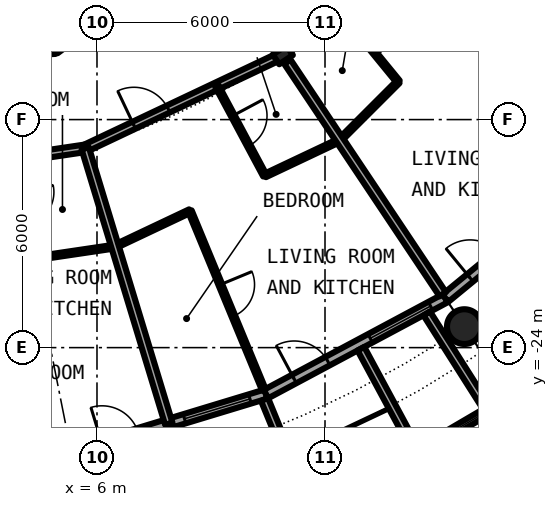
"""IFC4 building model, lengths in metres.
Left out: names, types, materials, properties, quantities, classifications, styles, units other than length and angle.
Written with IfcOpenShell. Run it as: python <this file> out.ifc"""

import sys

from ifc_helpers import new_model, si_unit, direction, frame, frame_2d, origin, origin_2d, place, context, subcontext, project, spatial, rectangle, circle, hollow_circle, i_section, extrude, element, fill, save


model = new_model("IFC4")
c1 = context("Model", 3, precision=1e-05, world=origin(), true_north=direction((0.0, 1.0)))
c2 = subcontext(c1, "Body", "Model", "MODEL_VIEW")
j1 = project(units=[si_unit("LENGTHUNIT", "METRE"), si_unit("PLANEANGLEUNIT", "RADIAN")], contexts=[c1])
p1 = place(None, origin())
s1 = spatial("IfcSite", under=j1, at=p1, CompositionType="ELEMENT")
p2 = place(p1, origin())
s2 = spatial("IfcBuilding", under=s1, at=p2, CompositionType="ELEMENT")
p3 = place(p2, frame((0.0, 0.0, 123.85)))
s3 = spatial("IfcBuildingStorey", under=s2, at=p3, CompositionType="ELEMENT", Elevation=123.85)
p4 = place(p3, frame((15.667, -23.448, 0.0), z_axis=(0.0, 0.0, 1.0), x_axis=(1.0, 0.0, 0.0)))
e1 = element("IfcColumn", 1, at=p4, inside=s3, PredefinedType="COLUMN", context=c2, shape_type="SweptSolid", body=[
    extrude(hollow_circle(Radius=0.457, WallThickness=0.04, at=origin_2d()), origin(), (0.0, 0.0, 1.0), 3.05),
])
p5 = place(p3, frame((10.889, -16.297, 0.0), z_axis=(0.0, 0.0, 1.0), x_axis=(0.55557023302, -0.831469612303, 0.0)))
e2 = element("IfcColumn", 2, at=p5, inside=s3, PredefinedType="COLUMN", context=c2, shape_type="SweptSolid", body=[
    extrude(i_section(OverallWidth=0.307, OverallDepth=0.432, WebThickness=0.021, FlangeThickness=0.04, FilletRadius=0.027, at=origin_2d()), origin(), (0.0, 0.0, 1.0), 3.05),
])
p6 = place(p3, frame((5.326, -26.775, 0.0), z_axis=(0.0, 0.0, 1.0), x_axis=(0.956965678721, 0.290201119486, 0.0)))
e3 = element("IfcWall", 3, at=p6, inside=s3, PredefinedType="SOLIDWALL", context=c2, shape_type="SweptSolid", body=[
    extrude(rectangle(XDim=5.351, YDim=0.25, at=frame_2d((2.676, 0.0))), origin(), (0.0, 0.0, 1.0), 2.7),
])
p7 = place(p6, frame((0.841, 0.0, 0.0)))
e4 = element("IfcOpeningElement", 4, at=p7, cuts=e3, PredefinedType="OPENING", context=c2, shape_type="SweptSolid", body=[
    extrude(rectangle(XDim=1.0, YDim=2.2, at=frame_2d((0.5, 1.1))), frame((0.0, 0.135, 0.0), z_axis=(0.0, -1.0, 0.0), x_axis=(1.0, 0.0, 0.0)), (0.0, 0.0, 1.0), 0.27),
])
p8 = place(p6, frame((3.111, 0.0, 0.3)))
e5 = element("IfcOpeningElement", 5, at=p8, cuts=e3, PredefinedType="OPENING", context=c2, shape_type="SweptSolid", body=[
    extrude(rectangle(XDim=1.8, YDim=2.1, at=frame_2d((0.9, 1.05))), frame((0.0, 0.135, 0.0), z_axis=(0.0, -1.0, 0.0), x_axis=(1.0, 0.0, 0.0)), (0.0, 0.0, 1.0), 0.27),
])
p9 = place(p3, frame((8.009, -26.092, -0.03), z_axis=(0.0, 0.0, 1.0), x_axis=(0.293406695073, -0.955987715029, 0.0)))
e6 = element("IfcWall", 6, at=p9, inside=s3, PredefinedType="SOLIDWALL", context=c2, shape_type="SweptSolid", body=[
    extrude(rectangle(XDim=3.006, YDim=0.2, at=frame_2d((1.503, 0.0))), origin(), (0.0, 0.0, 1.0), 2.73),
])
p10 = place(p3, frame((10.409, -25.364, -0.03), z_axis=(0.0, 0.0, 1.0), x_axis=(0.379509886562, -0.925187681501, 0.0)))
e7 = element("IfcWall", 7, at=p10, inside=s3, PredefinedType="SOLIDWALL", context=c2, shape_type="SweptSolid", body=[
    extrude(rectangle(XDim=2.883, YDim=0.2, at=frame_2d((1.441, 0.0))), origin(), (0.0, 0.0, 1.0), 2.73),
])
p11 = place(p3, frame((10.447, -25.222, 0.0), z_axis=(0.0, 0.0, 1.0), x_axis=(0.881915646801, 0.471407246368, 0.0)))
e8 = element("IfcWall", 8, at=p11, inside=s3, PredefinedType="SOLIDWALL", context=c2, shape_type="SweptSolid", body=[
    extrude(rectangle(XDim=5.352, YDim=0.25, at=frame_2d((2.676, 0.0))), origin(), (0.0, 0.0, 1.0), 2.7),
])
p12 = place(p11, frame((0.841, 0.0, 0.0)))
e9 = element("IfcOpeningElement", 9, at=p12, cuts=e8, PredefinedType="OPENING", context=c2, shape_type="SweptSolid", body=[
    extrude(rectangle(XDim=1.0, YDim=2.2, at=frame_2d((0.5, 1.1))), frame((0.0, 0.135, 0.0), z_axis=(0.0, -1.0, 0.0), x_axis=(1.0, 0.0, 0.0)), (0.0, 0.0, 1.0), 0.27),
])
p13 = place(p11, frame((3.111, 0.0, 0.3)))
e10 = element("IfcOpeningElement", 10, at=p13, cuts=e8, PredefinedType="OPENING", context=c2, shape_type="SweptSolid", body=[
    extrude(rectangle(XDim=1.8, YDim=2.1, at=frame_2d((0.9, 1.05))), frame((0.0, 0.135, 0.0), z_axis=(0.0, -1.0, 0.0), x_axis=(1.0, 0.0, 0.0)), (0.0, 0.0, 1.0), 0.27),
])
p14 = place(p3, frame((14.327, -26.812, -0.03), z_axis=(0.0, 0.0, 1.0), x_axis=(0.862762477128, 0.505609442218, 0.0)))
e11 = element("IfcWall", 11, at=p14, inside=s3, PredefinedType="SOLIDWALL", context=c2, shape_type="SweptSolid", body=[
    extrude(rectangle(XDim=2.391, YDim=0.2, at=frame_2d((1.196, 0.0))), origin(), (0.0, 0.0, 1.0), 2.73),
])
p15 = place(p14, frame((0.156, 0.0, 0.33)))
e12 = element("IfcOpeningElement", 12, at=p15, cuts=e11, PredefinedType="OPENING", context=c2, shape_type="SweptSolid", body=[
    extrude(circle(Radius=1.04, at=frame_2d((1.04, 1.04))), frame((0.0, 0.11, 0.0), z_axis=(0.0, -1.0, 0.0), x_axis=(1.0, 0.0, 0.0)), (0.0, 0.0, 1.0), 0.22),
])
p16 = place(p3, frame((12.945, -24.029, -0.03), z_axis=(0.0, 0.0, 1.0), x_axis=(0.474424310775, -0.88029629861, 0.0)))
e13 = element("IfcWall", 13, at=p16, inside=s3, PredefinedType="SOLIDWALL", context=c2, shape_type="SweptSolid", body=[
    extrude(rectangle(XDim=3.006, YDim=0.2, at=frame_2d((1.503, 0.0))), origin(), (0.0, 0.0, 1.0), 2.73),
])
p17 = place(p3, frame((14.678, -23.102, -0.03), z_axis=(0.0, 0.0, 1.0), x_axis=(0.536001536573, -0.844217005746, 0.0)))
e14 = element("IfcWall", 14, at=p17, inside=s3, PredefinedType="SOLIDWALL", context=c2, shape_type="SweptSolid", body=[
    extrude(rectangle(XDim=2.929, YDim=0.2, at=frame_2d((1.465, 0.0))), origin(), (0.0, 0.0, 1.0), 2.73),
])
p18 = place(p3, frame((15.167, -22.699, 0.0), z_axis=(0.0, 0.0, 1.0), x_axis=(0.773019449054, 0.634382322723, 0.0)))
e15 = element("IfcWall", 15, at=p18, inside=s3, PredefinedType="SOLIDWALL", context=c2, shape_type="SweptSolid", body=[
    extrude(rectangle(XDim=5.352, YDim=0.25, at=frame_2d((2.676, 0.0))), origin(), (0.0, 0.0, 1.0), 2.7),
])
p19 = place(p18, frame((0.841, 0.0, 0.0)))
e16 = element("IfcOpeningElement", 16, at=p19, cuts=e15, PredefinedType="OPENING", context=c2, shape_type="SweptSolid", body=[
    extrude(rectangle(XDim=1.0, YDim=2.2, at=frame_2d((0.5, 1.1))), frame((0.0, 0.135, 0.0), z_axis=(0.0, -1.0, 0.0), x_axis=(1.0, 0.0, 0.0)), (0.0, 0.0, 1.0), 0.27),
])
p20 = place(p18, frame((3.111, 0.0, 0.3)))
e17 = element("IfcOpeningElement", 17, at=p20, cuts=e15, PredefinedType="OPENING", context=c2, shape_type="SweptSolid", body=[
    extrude(rectangle(XDim=1.8, YDim=2.1, at=frame_2d((0.9, 1.05))), frame((0.0, 0.135, 0.0), z_axis=(0.0, -1.0, 0.0), x_axis=(1.0, 0.0, 0.0)), (0.0, 0.0, 1.0), 0.27),
])
p21 = place(p3, frame((4.316, -21.66, 0.0), z_axis=(0.0, 0.0, 1.0), x_axis=(0.989185420695, 0.146670390618, 0.0)))
e18 = element("IfcWall", 18, at=p21, inside=s3, PredefinedType="PARTITIONING", context=c2, shape_type="SweptSolid", body=[
    extrude(rectangle(XDim=2.181, YDim=0.1, at=frame_2d((1.09, 0.0))), origin(), (0.0, 0.0, 1.0), 2.7),
])
p22 = place(p3, frame((6.473, -21.34, 0.0), z_axis=(0.0, 0.0, 1.0), x_axis=(0.903929143338, 0.427682246328, 0.0)))
e19 = element("IfcWall", 19, at=p22, inside=s3, PredefinedType="PARTITIONING", context=c2, shape_type="SweptSolid", body=[
    extrude(rectangle(XDim=2.182, YDim=0.1, at=frame_2d((1.091, 0.0))), origin(), (0.0, 0.0, 1.0), 2.7),
])
p23 = place(p3, frame((10.425, -19.47, 0.0), z_axis=(0.0, 0.0, 1.0), x_axis=(0.903951937529, 0.427634066274, 0.0)))
e20 = element("IfcWall", 20, at=p23, inside=s3, PredefinedType="PARTITIONING", context=c2, shape_type="SweptSolid", body=[
    extrude(rectangle(XDim=2.181, YDim=0.1, at=frame_2d((1.091, 0.0))), origin(), (0.0, 0.0, 1.0), 2.7),
])
p24 = place(p3, frame((12.389, -18.542, 0.0), z_axis=(0.0, 0.0, 1.0), x_axis=(0.707106781187, 0.707106781187, 0.0)))
e21 = element("IfcWall", 21, at=p24, inside=s3, PredefinedType="PARTITIONING", context=c2, shape_type="SweptSolid", body=[
    extrude(rectangle(XDim=2.175, YDim=0.1, at=frame_2d((1.088, 0.0))), origin(), (0.0, 0.0, 1.0), 2.7),
])
p25 = place(p3, frame((3.939, -19.015, 0.0), z_axis=(0.0, 0.0, 1.0), x_axis=(0.989227802256, 0.146384272531, 0.0)))
e22 = element("IfcWall", 22, at=p25, inside=s3, PredefinedType="PARTITIONING", context=c2, shape_type="SweptSolid", body=[
    extrude(rectangle(XDim=1.776, YDim=0.2, at=frame_2d((0.888, 0.0))), origin(), (0.0, 0.0, 1.0), 2.39),
])
p26 = place(p3, frame((5.69, -18.756, 0.0), z_axis=(0.0, 0.0, 1.0), x_axis=(0.903968655954, 0.427598724335, 0.0)))
e23 = element("IfcWall", 23, at=p26, inside=s3, PredefinedType="PARTITIONING", context=c2, shape_type="SweptSolid", body=[
    extrude(rectangle(XDim=5.596, YDim=0.2, at=frame_2d((2.798, 0.0))), origin(), (0.0, 0.0, 1.0), 2.39),
])
p27 = place(p26, frame((1.418, 0.0, 0.0)))
e24 = element("IfcOpeningElement", 24, at=p27, cuts=e23, PredefinedType="OPENING", context=c2, shape_type="SweptSolid", body=[
    extrude(rectangle(XDim=1.0, YDim=2.3, at=frame_2d((0.5, 1.15))), frame((0.0, 0.11, 0.0), z_axis=(0.0, -1.0, 0.0), x_axis=(1.0, 0.0, 0.0)), (0.0, 0.0, 1.0), 0.22),
])
p28 = place(p3, frame((11.0, -16.186, 0.0), z_axis=(0.0, 0.0, 1.0), x_axis=(0.707106781187, 0.707106781187, 0.0)))
e25 = element("IfcWall", 25, at=p28, inside=s3, PredefinedType="PARTITIONING", context=c2, shape_type="SweptSolid", body=[
    extrude(rectangle(XDim=7.334, YDim=0.2, at=frame_2d((3.667, 0.0))), origin(), (0.0, 0.0, 1.0), 2.39),
])
p29 = place(p28, frame((4.123, 0.0, 0.0)))
e26 = element("IfcOpeningElement", 26, at=p29, cuts=e25, PredefinedType="OPENING", context=c2, shape_type="SweptSolid", body=[
    extrude(rectangle(XDim=1.0, YDim=2.3, at=frame_2d((0.5, 1.15))), frame((0.0, 0.11, 0.0), z_axis=(0.0, -1.0, 0.0), x_axis=(1.0, 0.0, 0.0)), (0.0, 0.0, 1.0), 0.22),
])
p30 = place(p3, frame((-3.297, -16.575, 0.0), z_axis=(0.0, 0.0, 1.0), x_axis=(0.998796706656, 0.0490422142, 0.0)))
e27 = element("IfcWall", 27, at=p30, inside=s3, PredefinedType="PARTITIONING", context=c2, shape_type="SweptSolid", body=[
    extrude(rectangle(XDim=8.214, YDim=0.2, at=frame_2d((4.107, 0.0))), origin(), (0.0, 0.0, 1.0), 2.7),
])
p31 = place(p30, frame((3.614, 0.0, 0.0)))
e28 = element("IfcOpeningElement", 28, at=p31, cuts=e27, PredefinedType="OPENING", context=c2, shape_type="SweptSolid", body=[
    extrude(rectangle(XDim=1.0, YDim=2.3, at=frame_2d((0.5, 1.15))), frame((0.0, 0.11, 0.0), z_axis=(0.0, -1.0, 0.0), x_axis=(1.0, 0.0, 0.0)), (0.0, 0.0, 1.0), 0.22),
])
p32 = place(p3, frame((4.906, -16.172, 0.0), z_axis=(0.0, 0.0, 1.0), x_axis=(0.803191461888, 0.595720971219, 0.0)))
e29 = element("IfcWall", 29, at=p32, inside=s3, PredefinedType="PARTITIONING", context=c2, shape_type="SweptSolid", body=[
    extrude(rectangle(XDim=9.76, YDim=0.2, at=frame_2d((4.88, 0.0))), origin(), (0.0, 0.0, 1.0), 2.7),
])
p33 = place(p32, frame((4.38, 0.0, 0.0)))
e30 = element("IfcOpeningElement", 30, at=p33, cuts=e29, PredefinedType="OPENING", context=c2, shape_type="SweptSolid", body=[
    extrude(rectangle(XDim=1.0, YDim=2.3, at=frame_2d((0.5, 1.15))), frame((0.0, 0.11, 0.0), z_axis=(0.0, -1.0, 0.0), x_axis=(1.0, 0.0, 0.0)), (0.0, 0.0, 1.0), 0.22),
])
p34 = place(p3, frame((5.69, -18.756, 0.0), z_axis=(0.0, 0.0, 1.0), x_axis=(0.290448401467, -0.95689065524, 0.0)))
e31 = element("IfcWall", 31, at=p34, inside=s3, PredefinedType="PARTITIONING", context=c2, shape_type="SweptSolid", body=[
    extrude(rectangle(XDim=7.574, YDim=0.2, at=frame_2d((3.787, 0.0))), origin(), (0.0, 0.0, 1.0), 2.7),
])
p35 = place(p3, frame((8.445, -20.407, 0.0), z_axis=(0.0, 0.0, 1.0), x_axis=(0.382339082848, -0.92402209158, 0.0)))
e32 = element("IfcWall", 32, at=p35, inside=s3, PredefinedType="PARTITIONING", context=c2, shape_type="SweptSolid", body=[
    extrude(rectangle(XDim=5.09, YDim=0.1, at=frame_2d((2.545, 0.0))), origin(), (0.0, 0.0, 1.0), 2.7),
])
p36 = place(p35, frame((2.095, 0.0, 0.0)))
e33 = element("IfcOpeningElement", 33, at=p36, cuts=e32, PredefinedType="OPENING", context=c2, shape_type="SweptSolid", body=[
    extrude(rectangle(XDim=0.9, YDim=2.3, at=frame_2d((0.45, 1.15))), frame((0.0, 0.06, 0.0), z_axis=(0.0, -1.0, 0.0), x_axis=(1.0, 0.0, 0.0)), (0.0, 0.0, 1.0), 0.12),
])
p37 = place(p3, frame((9.156, -17.117, 0.0), z_axis=(0.0, 0.0, 1.0), x_axis=(0.471701791767, -0.881758141241, 0.0)))
e34 = element("IfcWall", 34, at=p37, inside=s3, PredefinedType="PARTITIONING", context=c2, shape_type="SweptSolid", body=[
    extrude(rectangle(XDim=2.673, YDim=0.1, at=frame_2d((1.337, 0.0))), origin(), (0.0, 0.0, 1.0), 2.7),
])
p38 = place(p37, frame((0.887, 0.0, 0.0)))
e35 = element("IfcOpeningElement", 35, at=p38, cuts=e34, PredefinedType="OPENING", context=c2, shape_type="SweptSolid", body=[
    extrude(rectangle(XDim=0.9, YDim=2.3, at=frame_2d((0.45, 1.15))), frame((0.0, 0.06, 0.0), z_axis=(0.0, -1.0, 0.0), x_axis=(1.0, 0.0, 0.0)), (0.0, 0.0, 1.0), 0.12),
])
p39 = place(p3, frame((11.009, -16.477, 0.0), z_axis=(0.0, 0.0, 1.0), x_axis=(0.555664536482, -0.831406593008, 0.0)))
e36 = element("IfcWall", 36, at=p39, inside=s3, PredefinedType="PARTITIONING", context=c2, shape_type="SweptSolid", body=[
    extrude(rectangle(XDim=7.358, YDim=0.2, at=frame_2d((3.679, 0.0))), origin(), (0.0, 0.0, 1.0), 2.7),
])
p40 = place(p3, frame((12.241, -14.945, 0.0), z_axis=(0.0, 0.0, 1.0), x_axis=(0.633582447834, -0.77367517848, 0.0)))
e37 = element("IfcWall", 37, at=p40, inside=s3, PredefinedType="PARTITIONING", context=c2, shape_type="SweptSolid", body=[
    extrude(rectangle(XDim=2.661, YDim=0.1, at=frame_2d((1.331, 0.0))), origin(), (0.0, 0.0, 1.0), 2.7),
])
p41 = place(p40, frame((0.881, 0.0, 0.0)))
e38 = element("IfcOpeningElement", 38, at=p41, cuts=e37, PredefinedType="OPENING", context=c2, shape_type="SweptSolid", body=[
    extrude(rectangle(XDim=0.9, YDim=2.3, at=frame_2d((0.45, 1.15))), frame((0.0, 0.06, 0.0), z_axis=(0.0, -1.0, 0.0), x_axis=(1.0, 0.0, 0.0)), (0.0, 0.0, 1.0), 0.12),
])
p42 = place(p3, frame((15.465, -15.465, 0.0), z_axis=(0.0, 0.0, 1.0), x_axis=(0.707106781187, -0.707106781187, 0.0)))
e39 = element("IfcWall", 39, at=p42, inside=s3, PredefinedType="PARTITIONING", context=c2, shape_type="SweptSolid", body=[
    extrude(rectangle(XDim=5.305, YDim=0.1, at=frame_2d((2.652, 0.0))), origin(), (0.0, 0.0, 1.0), 2.7),
])
p43 = place(p42, frame((2.202, 0.0, 0.0)))
e40 = element("IfcOpeningElement", 40, at=p43, cuts=e39, PredefinedType="OPENING", context=c2, shape_type="SweptSolid", body=[
    extrude(rectangle(XDim=0.9, YDim=2.3, at=frame_2d((0.45, 1.15))), frame((0.0, 0.06, 0.0), z_axis=(0.0, -1.0, 0.0), x_axis=(1.0, 0.0, 0.0)), (0.0, 0.0, 1.0), 0.12),
])
p44 = place(p8, origin())
e41 = element("IfcWindow", 41, at=p44, inside=s3, PartitioningType="SINGLE_PANEL", PredefinedType="WINDOW", context=c2, shape_type="SweptSolid", body=[
    extrude(rectangle(XDim=1.8, YDim=2.1, at=frame_2d((0.9, 1.05))), frame((0.0, 0.03, 0.0), z_axis=(0.0, -1.0, 0.0), x_axis=(1.0, 0.0, 0.0)), (0.0, 0.0, 1.0), 0.06),
])
fill(e5, e41)
p45 = place(p12, origin())
e42 = element("IfcDoor", 42, at=p45, inside=s3, OperationType="SINGLE_SWING_LEFT", PredefinedType="DOOR", context=c2, shape_type="SweptSolid", body=[
    extrude(rectangle(XDim=1.0, YDim=2.2, at=frame_2d((0.5, 1.1))), frame((0.0, 0.025, 0.0), z_axis=(0.0, -1.0, 0.0), x_axis=(1.0, 0.0, 0.0)), (0.0, 0.0, 1.0), 0.05),
])
fill(e9, e42)
p46 = place(p13, origin())
e43 = element("IfcWindow", 43, at=p46, inside=s3, PartitioningType="SINGLE_PANEL", PredefinedType="WINDOW", context=c2, shape_type="SweptSolid", body=[
    extrude(rectangle(XDim=1.8, YDim=2.1, at=frame_2d((0.9, 1.05))), frame((0.0, 0.03, 0.0), z_axis=(0.0, -1.0, 0.0), x_axis=(1.0, 0.0, 0.0)), (0.0, 0.0, 1.0), 0.06),
])
fill(e10, e43)
p47 = place(p15, origin())
e44 = element("IfcWindow", 44, at=p47, inside=s3, PartitioningType="SINGLE_PANEL", PredefinedType="WINDOW", context=c2, shape_type="SweptSolid", body=[
    extrude(circle(Radius=1.04, at=frame_2d((1.04, 1.04))), frame((0.0, 0.03, 0.0), z_axis=(0.0, -1.0, 0.0), x_axis=(1.0, 0.0, 0.0)), (0.0, 0.0, 1.0), 0.06),
])
fill(e12, e44)
p48 = place(p19, origin())
e45 = element("IfcDoor", 45, at=p48, inside=s3, OperationType="SINGLE_SWING_LEFT", PredefinedType="DOOR", context=c2, shape_type="SweptSolid", body=[
    extrude(rectangle(XDim=1.0, YDim=2.2, at=frame_2d((0.5, 1.1))), frame((0.0, 0.025, 0.0), z_axis=(0.0, -1.0, 0.0), x_axis=(1.0, 0.0, 0.0)), (0.0, 0.0, 1.0), 0.05),
])
fill(e16, e45)
p49 = place(p27, origin())
e46 = element("IfcDoor", 46, at=p49, inside=s3, OperationType="SINGLE_SWING_LEFT", PredefinedType="DOOR", context=c2, shape_type="SweptSolid", body=[
    extrude(rectangle(XDim=1.0, YDim=2.3, at=frame_2d((0.5, 1.15))), frame((0.0, 0.025, 0.0), z_axis=(0.0, -1.0, 0.0), x_axis=(1.0, 0.0, 0.0)), (0.0, 0.0, 1.0), 0.05),
])
fill(e24, e46)
p50 = place(p38, origin())
e47 = element("IfcDoor", 47, at=p50, inside=s3, OperationType="SINGLE_SWING_LEFT", PredefinedType="DOOR", context=c2, shape_type="SweptSolid", body=[
    extrude(rectangle(XDim=0.9, YDim=2.3, at=frame_2d((0.45, 1.15))), frame((0.0, 0.025, 0.0), z_axis=(0.0, -1.0, 0.0), x_axis=(1.0, 0.0, 0.0)), (0.0, 0.0, 1.0), 0.05),
])
fill(e35, e47)
p51 = place(p36, origin())
e48 = element("IfcDoor", 48, at=p51, inside=s3, OperationType="SINGLE_SWING_LEFT", PredefinedType="DOOR", context=c2, shape_type="SweptSolid", body=[
    extrude(rectangle(XDim=0.9, YDim=2.3, at=frame_2d((0.45, 1.15))), frame((0.0, 0.025, 0.0), z_axis=(0.0, -1.0, 0.0), x_axis=(1.0, 0.0, 0.0)), (0.0, 0.0, 1.0), 0.05),
])
fill(e33, e48)
p52 = place(p41, origin())
e49 = element("IfcDoor", 49, at=p52, inside=s3, OperationType="SINGLE_SWING_LEFT", PredefinedType="DOOR", context=c2, shape_type="SweptSolid", body=[
    extrude(rectangle(XDim=0.9, YDim=2.3, at=frame_2d((0.45, 1.15))), frame((0.0, 0.025, 0.0), z_axis=(0.0, -1.0, 0.0), x_axis=(1.0, 0.0, 0.0)), (0.0, 0.0, 1.0), 0.05),
])
fill(e38, e49)
save(model, sys.argv[1])
